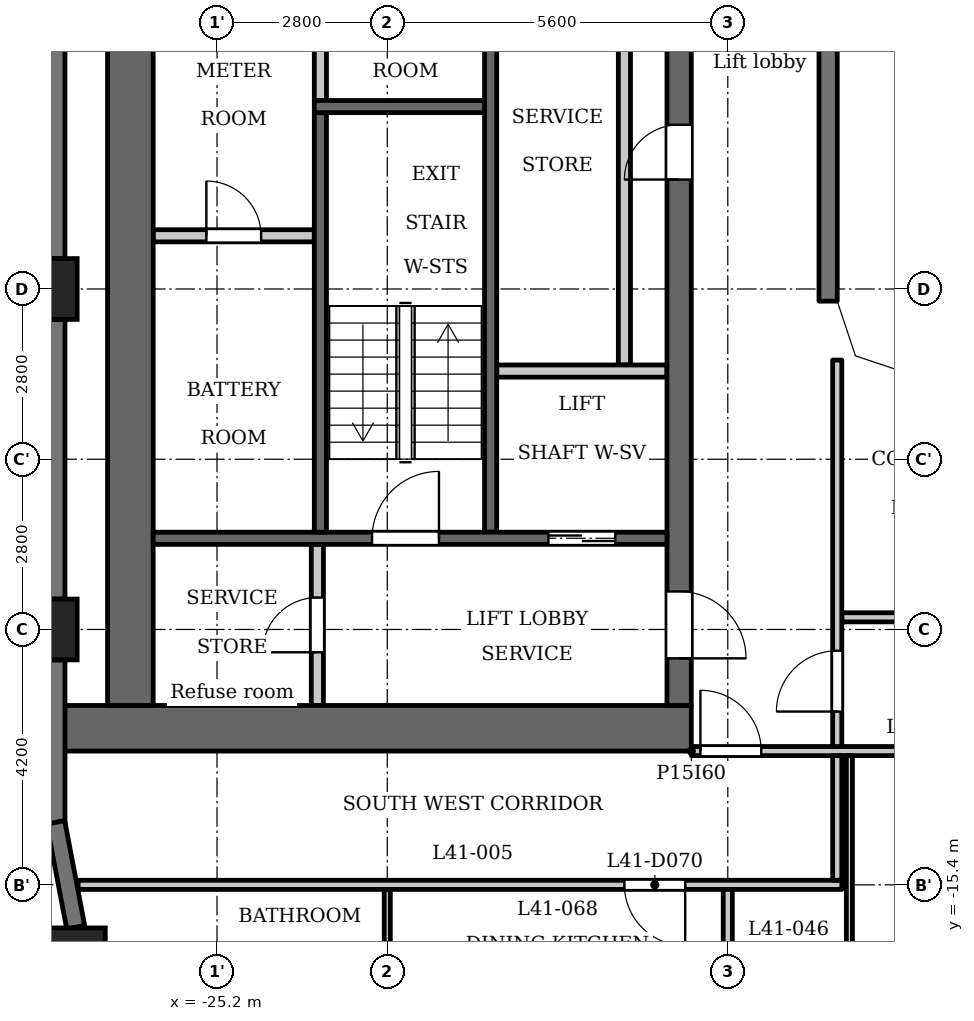
"""IFC4 building model, lengths in metres.
Left out: names, types, materials, properties, quantities, classifications, styles, units other than length and angle.
Written with IfcOpenShell. Run it as: python <this file> out.ifc"""

import sys

from ifc_helpers import new_model, si_unit, direction, frame, frame_2d, origin, origin_2d, place, context, subcontext, project, spatial, polyline, rectangle, outline, extrude, element, fill, save


model = new_model("IFC4")
c1 = context("Model", 3, precision=1e-05, world=origin(), true_north=direction((0.0, 1.0)))
c2 = subcontext(c1, "Body", "Model", "MODEL_VIEW")
j1 = project(units=[si_unit("LENGTHUNIT", "METRE"), si_unit("PLANEANGLEUNIT", "RADIAN")], contexts=[c1])
p1 = place(None, origin())
s1 = spatial("IfcSite", under=j1, at=p1, CompositionType="ELEMENT")
p2 = place(p1, origin())
s2 = spatial("IfcBuilding", under=s1, at=p2, CompositionType="ELEMENT")
p3 = place(p2, frame((0.0, 0.0, 160.6)))
s3 = spatial("IfcBuildingStorey", under=s2, at=p3, CompositionType="ELEMENT", Elevation=160.6)
for number, where, z_axis, x_axis in (
    (1, (-28.0, -5.6, 0.0), (0.0, 0.0, 1.0), (1.0, 0.0, 0.0)),
    (2, (-28.0, -11.2, 0.0), (0.0, 0.0, 1.0), (1.0, 0.0, 0.0)),
    (3, (-27.538, -16.609, 0.0), (0.0, 0.0, 1.0), (1.0, 0.0, 0.0)),
):
    element("IfcColumn", number, at=place(p3, frame(where, z_axis=z_axis, x_axis=x_axis)), inside=s3, PredefinedType="COLUMN", context=c2, shape_type="SweptSolid", body=[
        extrude(rectangle(XDim=1.0, YDim=1.0, at=origin_2d()), origin(), (0.0, 0.0, 1.0), 3.5),
    ])
p4 = place(p3, frame((-27.85, -0.5, 0.0), z_axis=(0.0, 0.0, 1.0), x_axis=(0.0, -1.0, 0.0)))
e4 = element("IfcWall", 4, at=p4, inside=s3, PredefinedType="SOLIDWALL", context=c2, shape_type="SweptSolid", body=[
    extrude(rectangle(XDim=4.6, YDim=0.3, at=frame_2d((2.3, 0.0))), origin(), (0.0, 0.0, 1.0), 2.45),
])
p5 = place(p3, frame((-27.85, -6.1, 0.0), z_axis=(0.0, 0.0, 1.0), x_axis=(0.0, -1.0, 0.0)))
e5 = element("IfcWall", 5, at=p5, inside=s3, PredefinedType="SOLIDWALL", context=c2, shape_type="SweptSolid", body=[
    extrude(rectangle(XDim=4.6, YDim=0.3, at=frame_2d((2.3, 0.0))), origin(), (0.0, 0.0, 1.0), 2.45),
])
p6 = place(p3, frame((-27.85, -11.7, 0.0), z_axis=(0.0, 0.0, 1.0), x_axis=(0.0, -1.0, 0.0)))
e6 = element("IfcWall", 6, at=p6, inside=s3, PredefinedType="SOLIDWALL", context=c2, shape_type="SweptSolid", body=[
    extrude(rectangle(XDim=2.7, YDim=0.3, at=frame_2d((1.35, 0.0))), origin(), (0.0, 0.0, 1.0), 2.45),
])
p7 = place(p3, frame((-27.853, -14.372, 0.0), z_axis=(0.0, 0.0, 1.0), x_axis=(0.187259034321, -0.982310569049, 0.0)))
e7 = element("IfcWall", 7, at=p7, inside=s3, PredefinedType="SOLIDWALL", context=c2, shape_type="SweptSolid", body=[
    extrude(rectangle(XDim=1.756, YDim=0.3, at=frame_2d((0.878, 0.0))), origin(), (0.0, 0.0, 1.0), 2.45),
])
p8 = place(p3, frame((-15.15, -5.8, 0.0), z_axis=(0.0, 0.0, 1.0), x_axis=(0.0, 1.0, 0.0)))
e8 = element("IfcWall", 8, at=p8, inside=s3, PredefinedType="SOLIDWALL", context=c2, shape_type="SweptSolid", body=[
    extrude(rectangle(XDim=11.6, YDim=0.3, at=frame_2d((5.8, 0.0))), origin(), (0.0, 0.0, 1.0), 3.2),
])
p9 = place(p3, frame((-23.5, -2.5, 0.0), z_axis=(0.0, 0.0, 1.0), x_axis=(0.0, 1.0, 0.0)))
e9 = element("IfcWall", 9, at=p9, inside=s3, PredefinedType="PARTITIONING", context=c2, shape_type="SweptSolid", body=[
    extrude(rectangle(XDim=2.65, YDim=0.2, at=frame_2d((1.325, 0.0))), origin(), (0.0, 0.0, 1.0), 3.2),
])
p10 = place(p3, frame((-20.7, -9.6, 0.0), z_axis=(0.0, 0.0, 1.0), x_axis=(0.0, 1.0, 0.0)))
e10 = element("IfcWall", 10, at=p10, inside=s3, PredefinedType="SHEAR", context=c2, shape_type="SweptSolid", body=[
    extrude(rectangle(XDim=9.75, YDim=0.2, at=frame_2d((4.875, 0.0))), origin(), (0.0, 0.0, 1.0), 3.2),
])
p11 = place(p3, frame((-17.4, -12.825, 0.0), z_axis=(0.0, 0.0, 1.0), x_axis=(-1.0, 0.0, 0.0)))
e11 = element("IfcWall", 11, at=p11, inside=s3, PredefinedType="SHEAR", context=c2, shape_type="SweptSolid", body=[
    extrude(rectangle(XDim=10.4, YDim=0.75, at=frame_2d((5.2, 0.0))), origin(), (0.0, 0.0, 1.0), 3.2),
])
p12 = place(p3, frame((-18.5, -6.85, 0.0), z_axis=(0.0, 0.0, 1.0), x_axis=(0.0, 1.0, 0.0)))
e12 = element("IfcWall", 12, at=p12, inside=s3, PredefinedType="PARTITIONING", context=c2, shape_type="SweptSolid", body=[
    extrude(rectangle(XDim=7.0, YDim=0.2, at=frame_2d((3.5, 0.0))), origin(), (0.0, 0.0, 1.0), 3.2),
])
p13 = place(p3, frame((-17.6, -12.45, 0.0), z_axis=(0.0, 0.0, 1.0), x_axis=(0.0, 1.0, 0.0)))
e13 = element("IfcWall", 13, at=p13, inside=s3, PredefinedType="SHEAR", context=c2, shape_type="SweptSolid", body=[
    extrude(rectangle(XDim=24.9, YDim=0.4, at=frame_2d((12.45, 0.0))), origin(), (0.0, 0.0, 1.0), 3.2),
])
p14 = place(p13, frame((8.65, 0.0, 0.0)))
e14 = element("IfcOpeningElement", 14, at=p14, cuts=e13, PredefinedType="OPENING", context=c2, shape_type="SweptSolid", body=[
    extrude(rectangle(XDim=0.9, YDim=2.1, at=frame_2d((0.45, 1.05))), frame((0.0, 0.21, 0.0), z_axis=(0.0, -1.0, 0.0), x_axis=(1.0, 0.0, 0.0)), (0.0, 0.0, 1.0), 0.42),
])
p15 = place(p13, frame((15.6, 0.0, 0.0)))
e15 = element("IfcOpeningElement", 15, at=p15, cuts=e13, PredefinedType="OPENING", context=c2, shape_type="SweptSolid", body=[
    extrude(rectangle(XDim=1.1, YDim=2.1, at=frame_2d((0.55, 1.05))), frame((0.0, 0.21, 0.0), z_axis=(0.0, -1.0, 0.0), x_axis=(1.0, 0.0, 0.0)), (0.0, 0.0, 1.0), 0.42),
])
p16 = place(p13, frame((18.0, 0.0, 0.0)))
e16 = element("IfcOpeningElement", 16, at=p16, cuts=e13, PredefinedType="OPENING", context=c2, shape_type="SweptSolid", body=[
    extrude(rectangle(XDim=1.1, YDim=2.1, at=frame_2d((0.55, 1.05))), frame((0.0, 0.21, 0.0), z_axis=(0.0, -1.0, 0.0), x_axis=(1.0, 0.0, 0.0)), (0.0, 0.0, 1.0), 0.42),
])
p17 = place(p13, frame((23.025, 0.0, 0.0)))
e17 = element("IfcOpeningElement", 17, at=p17, cuts=e13, PredefinedType="OPENING", context=c2, shape_type="SweptSolid", body=[
    extrude(rectangle(XDim=1.1, YDim=2.1, at=frame_2d((0.55, 1.05))), frame((0.0, 0.21, 0.0), z_axis=(0.0, -1.0, 0.0), x_axis=(1.0, 0.0, 0.0)), (0.0, 0.0, 1.0), 0.42),
])
p18 = place(p13, frame((0.775, 0.0, 0.0)))
e18 = element("IfcOpeningElement", 18, at=p18, cuts=e13, PredefinedType="OPENING", context=c2, shape_type="SweptSolid", body=[
    extrude(rectangle(XDim=1.1, YDim=2.1, at=frame_2d((0.55, 1.05))), frame((0.0, 0.21, 0.0), z_axis=(0.0, -1.0, 0.0), x_axis=(1.0, 0.0, 0.0)), (0.0, 0.0, 1.0), 0.42),
])
p19 = place(p13, frame((12.925, 0.0, 0.0)))
e19 = element("IfcOpeningElement", 19, at=p19, cuts=e13, PredefinedType="OPENING", context=c2, shape_type="SweptSolid", body=[
    extrude(rectangle(XDim=1.8, YDim=2.1, at=frame_2d((0.9, 1.05))), frame((0.0, 0.21, 0.0), z_axis=(0.0, -1.0, 0.0), x_axis=(1.0, 0.0, 0.0)), (0.0, 0.0, 1.0), 0.42),
])
p20 = place(p3, frame((-26.625, -12.45, 0.0), z_axis=(0.0, 0.0, 1.0), x_axis=(0.0, 1.0, 0.0)))
e20 = element("IfcWall", 20, at=p20, inside=s3, PredefinedType="SHEAR", context=c2, shape_type="SweptSolid", body=[
    extrude(rectangle(XDim=24.9, YDim=0.75, at=frame_2d((12.45, 0.0))), origin(), (0.0, 0.0, 1.0), 3.2),
])
p21 = place(p3, frame((-23.55, -12.45, 0.0), z_axis=(0.0, 0.0, 1.0), x_axis=(0.0, 1.0, 0.0)))
e21 = element("IfcWall", 21, at=p21, inside=s3, PredefinedType="PARTITIONING", context=c2, shape_type="SweptSolid", body=[
    extrude(rectangle(XDim=2.65, YDim=0.2, at=frame_2d((1.325, 0.0))), origin(), (0.0, 0.0, 1.0), 3.2),
])
p22 = place(p21, frame((0.875, 0.0, 0.0)))
e22 = element("IfcOpeningElement", 22, at=p22, cuts=e21, PredefinedType="OPENING", context=c2, shape_type="SweptSolid", body=[
    extrude(rectangle(XDim=0.9, YDim=2.1, at=frame_2d((0.45, 1.05))), frame((0.0, 0.11, 0.0), z_axis=(0.0, -1.0, 0.0), x_axis=(1.0, 0.0, 0.0)), (0.0, 0.0, 1.0), 0.22),
])
p23 = place(p3, frame((-23.6, -4.725, 0.0), z_axis=(0.0, 0.0, 1.0), x_axis=(-1.0, 0.0, 0.0)))
e23 = element("IfcWall", 23, at=p23, inside=s3, PredefinedType="PARTITIONING", context=c2, shape_type="SweptSolid", body=[
    extrude(rectangle(XDim=2.65, YDim=0.2, at=frame_2d((1.325, 0.0))), origin(), (0.0, 0.0, 1.0), 3.2),
])
p24 = place(p23, frame((0.875, 0.0, 0.0)))
e24 = element("IfcOpeningElement", 24, at=p24, cuts=e23, PredefinedType="OPENING", context=c2, shape_type="SweptSolid", body=[
    extrude(rectangle(XDim=0.9, YDim=2.1, at=frame_2d((0.45, 1.05))), frame((0.0, 0.11, 0.0), z_axis=(0.0, -1.0, 0.0), x_axis=(1.0, 0.0, 0.0)), (0.0, 0.0, 1.0), 0.22),
])
p25 = place(p3, frame((-17.8, -9.7, 0.0), z_axis=(0.0, 0.0, 1.0), x_axis=(-1.0, 0.0, 0.0)))
e25 = element("IfcWall", 25, at=p25, inside=s3, PredefinedType="SHEAR", context=c2, shape_type="SweptSolid", body=[
    extrude(rectangle(XDim=8.45, YDim=0.2, at=frame_2d((4.225, 0.0))), origin(), (0.0, 0.0, 1.0), 3.2),
])
p26 = place(p25, frame((0.85, 0.0, 0.0)))
e26 = element("IfcOpeningElement", 26, at=p26, cuts=e25, PredefinedType="OPENING", context=c2, shape_type="SweptSolid", body=[
    extrude(rectangle(XDim=1.1, YDim=2.1, at=frame_2d((0.55, 1.05))), frame((0.0, 0.11, 0.0), z_axis=(0.0, -1.0, 0.0), x_axis=(1.0, 0.0, 0.0)), (0.0, 0.0, 1.0), 0.22),
])
p27 = place(p25, frame((3.75, 0.0, 0.0)))
e27 = element("IfcOpeningElement", 27, at=p27, cuts=e25, PredefinedType="OPENING", context=c2, shape_type="SweptSolid", body=[
    extrude(rectangle(XDim=1.1, YDim=2.1, at=frame_2d((0.55, 1.05))), frame((0.0, 0.11, 0.0), z_axis=(0.0, -1.0, 0.0), x_axis=(1.0, 0.0, 0.0)), (0.0, 0.0, 1.0), 0.22),
])
p28 = place(p3, frame((-17.8, -6.95, 0.0), z_axis=(0.0, 0.0, 1.0), x_axis=(-1.0, 0.0, 0.0)))
e28 = element("IfcWall", 28, at=p28, inside=s3, PredefinedType="PARTITIONING", context=c2, shape_type="SweptSolid", body=[
    extrude(rectangle(XDim=2.8, YDim=0.2, at=frame_2d((1.4, 0.0))), origin(), (0.0, 0.0, 1.0), 3.2),
])
p29 = place(p3, frame((-23.5, -9.6, 0.0), z_axis=(0.0, 0.0, 1.0), x_axis=(0.0, 1.0, 0.0)))
e29 = element("IfcWall", 29, at=p29, inside=s3, PredefinedType="SHEAR", context=c2, shape_type="SweptSolid", body=[
    extrude(rectangle(XDim=6.9, YDim=0.2, at=frame_2d((3.45, 0.0))), origin(), (0.0, 0.0, 1.0), 3.2),
])
p30 = place(p3, frame((-20.8, -2.6, 0.0), z_axis=(0.0, 0.0, 1.0), x_axis=(-1.0, 0.0, 0.0)))
e30 = element("IfcWall", 30, at=p30, inside=s3, PredefinedType="SHEAR", context=c2, shape_type="SweptSolid", body=[
    extrude(rectangle(XDim=2.8, YDim=0.2, at=frame_2d((1.4, 0.0))), origin(), (0.0, 0.0, 1.0), 3.2),
])
p31 = place(p3, frame((-27.484, -15.4, 0.0), z_axis=(0.0, 0.0, 1.0), x_axis=(1.0, 0.0, 0.0)))
e31 = element("IfcWall", 31, at=p31, inside=s3, PredefinedType="PARTITIONING", context=c2, shape_type="SweptSolid", body=[
    extrude(rectangle(XDim=12.559, YDim=0.15, at=frame_2d((6.279, 0.0))), origin(), (0.0, 0.0, 1.0), 3.2),
])
p32 = place(p31, frame((8.984, 0.0, 0.0)))
e32 = element("IfcOpeningElement", 32, at=p32, cuts=e31, PredefinedType="OPENING", context=c2, shape_type="SweptSolid", body=[
    extrude(rectangle(XDim=1.0, YDim=2.1, at=frame_2d((0.5, 1.05))), frame((0.0, 0.085, 0.0), z_axis=(0.0, -1.0, 0.0), x_axis=(1.0, 0.0, 0.0)), (0.0, 0.0, 1.0), 0.17),
])
p33 = place(p3, frame((-17.4, -13.2, 0.0), z_axis=(0.0, 0.0, 1.0), x_axis=(1.0, 0.0, 0.0)))
e33 = element("IfcWall", 33, at=p33, inside=s3, PredefinedType="PARTITIONING", context=c2, shape_type="SweptSolid", body=[
    extrude(rectangle(XDim=34.8, YDim=0.15, at=frame_2d((17.4, 0.0))), origin(), (0.0, 0.0, 1.0), 3.2),
])
p34 = place(p33, frame((0.15, 0.0, 0.0)))
e34 = element("IfcOpeningElement", 34, at=p34, cuts=e33, PredefinedType="OPENING", context=c2, shape_type="SweptSolid", body=[
    extrude(rectangle(XDim=1.0, YDim=2.1, at=frame_2d((0.5, 1.05))), frame((0.0, 0.085, 0.0), z_axis=(0.0, -1.0, 0.0), x_axis=(1.0, 0.0, 0.0)), (0.0, 0.0, 1.0), 0.17),
])
p35 = place(p33, frame((33.55, 0.0, 0.0)))
e35 = element("IfcOpeningElement", 35, at=p35, cuts=e33, PredefinedType="OPENING", context=c2, shape_type="SweptSolid", body=[
    extrude(rectangle(XDim=1.0, YDim=2.1, at=frame_2d((0.5, 1.05))), frame((0.0, 0.085, 0.0), z_axis=(0.0, -1.0, 0.0), x_axis=(1.0, 0.0, 0.0)), (0.0, 0.0, 1.0), 0.17),
])
p36 = place(p33, frame((3.5, 0.0, 0.0)))
e36 = element("IfcOpeningElement", 36, at=p36, cuts=e33, PredefinedType="OPENING", context=c2, shape_type="SweptSolid", body=[
    extrude(rectangle(XDim=1.0, YDim=2.1, at=frame_2d((0.5, 1.05))), frame((0.0, 0.085, 0.0), z_axis=(0.0, -1.0, 0.0), x_axis=(1.0, 0.0, 0.0)), (0.0, 0.0, 1.0), 0.17),
])
p37 = place(p33, frame((10.1, 0.0, 0.0)))
e37 = element("IfcOpeningElement", 37, at=p37, cuts=e33, PredefinedType="OPENING", context=c2, shape_type="SweptSolid", body=[
    extrude(rectangle(XDim=1.0, YDim=2.1, at=frame_2d((0.5, 1.05))), frame((0.0, 0.085, 0.0), z_axis=(0.0, -1.0, 0.0), x_axis=(1.0, 0.0, 0.0)), (0.0, 0.0, 1.0), 0.17),
])
p38 = place(p33, frame((15.7, 0.0, 0.0)))
e38 = element("IfcOpeningElement", 38, at=p38, cuts=e33, PredefinedType="OPENING", context=c2, shape_type="SweptSolid", body=[
    extrude(rectangle(XDim=1.0, YDim=2.1, at=frame_2d((0.5, 1.05))), frame((0.0, 0.085, 0.0), z_axis=(0.0, -1.0, 0.0), x_axis=(1.0, 0.0, 0.0)), (0.0, 0.0, 1.0), 0.17),
])
p39 = place(p33, frame((18.05, 0.0, 0.0)))
e39 = element("IfcOpeningElement", 39, at=p39, cuts=e33, PredefinedType="OPENING", context=c2, shape_type="SweptSolid", body=[
    extrude(rectangle(XDim=1.0, YDim=2.1, at=frame_2d((0.5, 1.05))), frame((0.0, 0.085, 0.0), z_axis=(0.0, -1.0, 0.0), x_axis=(1.0, 0.0, 0.0)), (0.0, 0.0, 1.0), 0.17),
])
p40 = place(p33, frame((26.9, 0.0, 0.0)))
e40 = element("IfcOpeningElement", 40, at=p40, cuts=e33, PredefinedType="OPENING", context=c2, shape_type="SweptSolid", body=[
    extrude(rectangle(XDim=1.0, YDim=2.1, at=frame_2d((0.5, 1.05))), frame((0.0, 0.085, 0.0), z_axis=(0.0, -1.0, 0.0), x_axis=(1.0, 0.0, 0.0)), (0.0, 0.0, 1.0), 0.17),
])
p41 = place(p3, frame((-14.925, -11.0, 0.0), z_axis=(0.0, 0.0, 1.0), x_axis=(1.0, 0.0, 0.0)))
e41 = element("IfcWall", 41, at=p41, inside=s3, PredefinedType="PARTITIONING", context=c2, shape_type="SweptSolid", body=[
    extrude(rectangle(XDim=29.85, YDim=0.15, at=frame_2d((14.925, 0.0))), origin(), (0.0, 0.0, 1.0), 3.2),
])
p42 = place(p41, frame((2.075, 0.0, 0.0)))
e42 = element("IfcOpeningElement", 42, at=p42, cuts=e41, PredefinedType="OPENING", context=c2, shape_type="SweptSolid", body=[
    extrude(rectangle(XDim=1.0, YDim=2.1, at=frame_2d((0.5, 1.05))), frame((0.0, 0.085, 0.0), z_axis=(0.0, -1.0, 0.0), x_axis=(1.0, 0.0, 0.0)), (0.0, 0.0, 1.0), 0.17),
])
p43 = place(p41, frame((4.425, 0.0, 0.0)))
e43 = element("IfcOpeningElement", 43, at=p43, cuts=e41, PredefinedType="OPENING", context=c2, shape_type="SweptSolid", body=[
    extrude(rectangle(XDim=1.0, YDim=2.1, at=frame_2d((0.5, 1.05))), frame((0.0, 0.085, 0.0), z_axis=(0.0, -1.0, 0.0), x_axis=(1.0, 0.0, 0.0)), (0.0, 0.0, 1.0), 0.17),
])
p44 = place(p41, frame((13.275, 0.0, 0.0)))
e44 = element("IfcOpeningElement", 44, at=p44, cuts=e41, PredefinedType="OPENING", context=c2, shape_type="SweptSolid", body=[
    extrude(rectangle(XDim=1.0, YDim=2.1, at=frame_2d((0.5, 1.05))), frame((0.0, 0.085, 0.0), z_axis=(0.0, -1.0, 0.0), x_axis=(1.0, 0.0, 0.0)), (0.0, 0.0, 1.0), 0.17),
])
p45 = place(p41, frame((15.625, 0.0, 0.0)))
e45 = element("IfcOpeningElement", 45, at=p45, cuts=e41, PredefinedType="OPENING", context=c2, shape_type="SweptSolid", body=[
    extrude(rectangle(XDim=1.0, YDim=2.1, at=frame_2d((0.5, 1.05))), frame((0.0, 0.085, 0.0), z_axis=(0.0, -1.0, 0.0), x_axis=(1.0, 0.0, 0.0)), (0.0, 0.0, 1.0), 0.17),
])
p46 = place(p41, frame((24.475, 0.0, 0.0)))
e46 = element("IfcOpeningElement", 46, at=p46, cuts=e41, PredefinedType="OPENING", context=c2, shape_type="SweptSolid", body=[
    extrude(rectangle(XDim=1.0, YDim=2.1, at=frame_2d((0.5, 1.05))), frame((0.0, 0.085, 0.0), z_axis=(0.0, -1.0, 0.0), x_axis=(1.0, 0.0, 0.0)), (0.0, 0.0, 1.0), 0.17),
])
p47 = place(p41, frame((26.774, 0.0, 0.0)))
e47 = element("IfcOpeningElement", 47, at=p47, cuts=e41, PredefinedType="OPENING", context=c2, shape_type="SweptSolid", body=[
    extrude(rectangle(XDim=1.0, YDim=2.1, at=frame_2d((0.5, 1.05))), frame((0.0, 0.085, 0.0), z_axis=(0.0, -1.0, 0.0), x_axis=(1.0, 0.0, 0.0)), (0.0, 0.0, 1.0), 0.17),
])
p48 = place(p3, frame((-22.4, -17.75, 0.0), z_axis=(0.0, 0.0, 1.0), x_axis=(0.0, 1.0, 0.0)))
e48 = element("IfcWall", 48, at=p48, inside=s3, PredefinedType="PARTITIONING", context=c2, shape_type="SweptSolid", body=[
    extrude(rectangle(XDim=2.275, YDim=0.1, at=frame_2d((1.137, 0.0))), origin(), (0.0, 0.0, 1.0), 3.2),
])
p49 = place(p3, frame((-16.8, -22.88, 0.0), z_axis=(0.0, 0.0, 1.0), x_axis=(0.0, 1.0, 0.0)))
e49 = element("IfcWall", 49, at=p49, inside=s3, PredefinedType="PARTITIONING", context=c2, shape_type="SweptSolid", body=[
    extrude(rectangle(XDim=7.405, YDim=0.15, at=frame_2d((3.702, 0.0))), origin(), (0.0, 0.0, 1.0), 3.2),
])
p50 = place(p3, frame((-15.0, -15.325, 0.0), z_axis=(0.0, 0.0, 1.0), x_axis=(0.0, 1.0, 0.0)))
e50 = element("IfcWall", 50, at=p50, inside=s3, PredefinedType="PARTITIONING", context=c2, shape_type="SweptSolid", body=[
    extrude(rectangle(XDim=2.05, YDim=0.15, at=frame_2d((1.025, 0.0))), origin(), (0.0, 0.0, 1.0), 3.2),
])
p51 = place(p3, frame((-15.0, -13.125, 0.0), z_axis=(0.0, 0.0, 1.0), x_axis=(0.0, 1.0, 0.0)))
e51 = element("IfcWall", 51, at=p51, inside=s3, PredefinedType="PARTITIONING", context=c2, shape_type="SweptSolid", body=[
    extrude(rectangle(XDim=6.356, YDim=0.15, at=frame_2d((3.178, 0.0))), origin(), (0.0, 0.0, 1.0), 3.2),
])
p52 = place(p51, frame((0.575, 0.0, 0.0)))
e52 = element("IfcOpeningElement", 52, at=p52, cuts=e51, PredefinedType="OPENING", context=c2, shape_type="SweptSolid", body=[
    extrude(rectangle(XDim=1.0, YDim=2.1, at=frame_2d((0.5, 1.05))), frame((0.0, 0.085, 0.0), z_axis=(0.0, -1.0, 0.0), x_axis=(1.0, 0.0, 0.0)), (0.0, 0.0, 1.0), 0.17),
])
p53 = place(p3, frame((-14.8, -17.05, 0.0), z_axis=(0.0, 0.0, 1.0), x_axis=(0.0, 1.0, 0.0)))
e53 = element("IfcWall", 53, at=p53, inside=s3, PredefinedType="PARTITIONING", context=c2, shape_type="SweptSolid", body=[
    extrude(rectangle(XDim=3.775, YDim=0.1, at=frame_2d((1.888, 0.0))), origin(), (0.0, 0.0, 1.0), 3.2),
])
p54 = place(p3, origin())
e54 = element("IfcWall", 54, at=p54, inside=s3, PredefinedType="SOLIDWALL", context=c2, shape_type="SweptSolid", body=[
    extrude(outline(polyline([(-14.937, -6.937), (-13.849, -7.3), (-13.8, -7.3), (-13.8, -7.0), (-14.7, -6.7), (-15.0, -5.8), (-15.3, -5.8), (-15.3, -5.849), (-14.937, -6.937)])), origin(), (0.0, 0.0, 1.0), 3.2),
])
p55 = place(p26, origin())
e55 = element("IfcDoor", 55, at=p55, inside=s3, OperationType="DOUBLE_DOOR_SLIDING", PredefinedType="DOOR", context=c2, shape_type="SweptSolid", body=[
    extrude(rectangle(XDim=1.1, YDim=2.1, at=frame_2d((0.55, 1.05))), frame((0.0, 0.025, 0.0), z_axis=(0.0, -1.0, 0.0), x_axis=(1.0, 0.0, 0.0)), (0.0, 0.0, 1.0), 0.05),
])
fill(e26, e55)
p56 = place(p14, origin())
e56 = element("IfcDoor", 56, at=p56, inside=s3, OperationType="SINGLE_SWING_RIGHT", PredefinedType="DOOR", context=c2, shape_type="SweptSolid", body=[
    extrude(rectangle(XDim=0.9, YDim=2.1, at=frame_2d((0.45, 1.05))), frame((0.0, 0.025, 0.0), z_axis=(0.0, -1.0, 0.0), x_axis=(1.0, 0.0, 0.0)), (0.0, 0.0, 1.0), 0.05),
])
fill(e14, e56)
p57 = place(p18, origin())
e57 = element("IfcDoor", 57, at=p57, inside=s3, OperationType="SINGLE_SWING_LEFT", PredefinedType="DOOR", context=c2, shape_type="SweptSolid", body=[
    extrude(rectangle(XDim=1.1, YDim=2.1, at=frame_2d((0.55, 1.05))), frame((0.0, 0.025, 0.0), z_axis=(0.0, -1.0, 0.0), x_axis=(1.0, 0.0, 0.0)), (0.0, 0.0, 1.0), 0.05),
])
fill(e18, e57)
p58 = place(p22, origin())
e58 = element("IfcDoor", 58, at=p58, inside=s3, OperationType="SINGLE_SWING_RIGHT", PredefinedType="DOOR", context=c2, shape_type="SweptSolid", body=[
    extrude(rectangle(XDim=0.9, YDim=2.1, at=frame_2d((0.45, 1.05))), frame((0.0, 0.025, 0.0), z_axis=(0.0, -1.0, 0.0), x_axis=(1.0, 0.0, 0.0)), (0.0, 0.0, 1.0), 0.05),
])
fill(e22, e58)
p59 = place(p27, origin())
e59 = element("IfcDoor", 59, at=p59, inside=s3, OperationType="SINGLE_SWING_LEFT", PredefinedType="DOOR", context=c2, shape_type="SweptSolid", body=[
    extrude(rectangle(XDim=1.1, YDim=2.1, at=frame_2d((0.55, 1.05))), frame((0.0, 0.025, 0.0), z_axis=(0.0, -1.0, 0.0), x_axis=(1.0, 0.0, 0.0)), (0.0, 0.0, 1.0), 0.05),
])
fill(e27, e59)
p60 = place(p24, origin())
e60 = element("IfcDoor", 60, at=p60, inside=s3, OperationType="SINGLE_SWING_RIGHT", PredefinedType="DOOR", context=c2, shape_type="SweptSolid", body=[
    extrude(rectangle(XDim=0.9, YDim=2.1, at=frame_2d((0.45, 1.05))), frame((0.0, 0.025, 0.0), z_axis=(0.0, -1.0, 0.0), x_axis=(1.0, 0.0, 0.0)), (0.0, 0.0, 1.0), 0.05),
])
fill(e24, e60)
p61 = place(p52, origin())
e61 = element("IfcDoor", 61, at=p61, inside=s3, OperationType="SINGLE_SWING_RIGHT", PredefinedType="DOOR", context=c2, shape_type="SweptSolid", body=[
    extrude(rectangle(XDim=1.0, YDim=2.1, at=frame_2d((0.5, 1.05))), frame((0.0, 0.025, 0.0), z_axis=(0.0, -1.0, 0.0), x_axis=(1.0, 0.0, 0.0)), (0.0, 0.0, 1.0), 0.05),
])
fill(e52, e61)
p62 = place(p34, origin())
e62 = element("IfcDoor", 62, at=p62, inside=s3, OperationType="SINGLE_SWING_RIGHT", PredefinedType="DOOR", context=c2, shape_type="SweptSolid", body=[
    extrude(rectangle(XDim=1.0, YDim=2.1, at=frame_2d((0.5, 1.05))), frame((0.0, 0.025, 0.0), z_axis=(0.0, -1.0, 0.0), x_axis=(1.0, 0.0, 0.0)), (0.0, 0.0, 1.0), 0.05),
])
fill(e34, e62)
p63 = place(p32, origin())
e63 = element("IfcDoor", 63, at=p63, inside=s3, OperationType="SINGLE_SWING_RIGHT", PredefinedType="DOOR", context=c2, shape_type="SweptSolid", body=[
    extrude(rectangle(XDim=1.0, YDim=2.1, at=frame_2d((0.5, 1.05))), frame((0.0, 0.025, 0.0), z_axis=(0.0, -1.0, 0.0), x_axis=(1.0, 0.0, 0.0)), (0.0, 0.0, 1.0), 0.05),
])
fill(e32, e63)
save(model, sys.argv[1])
